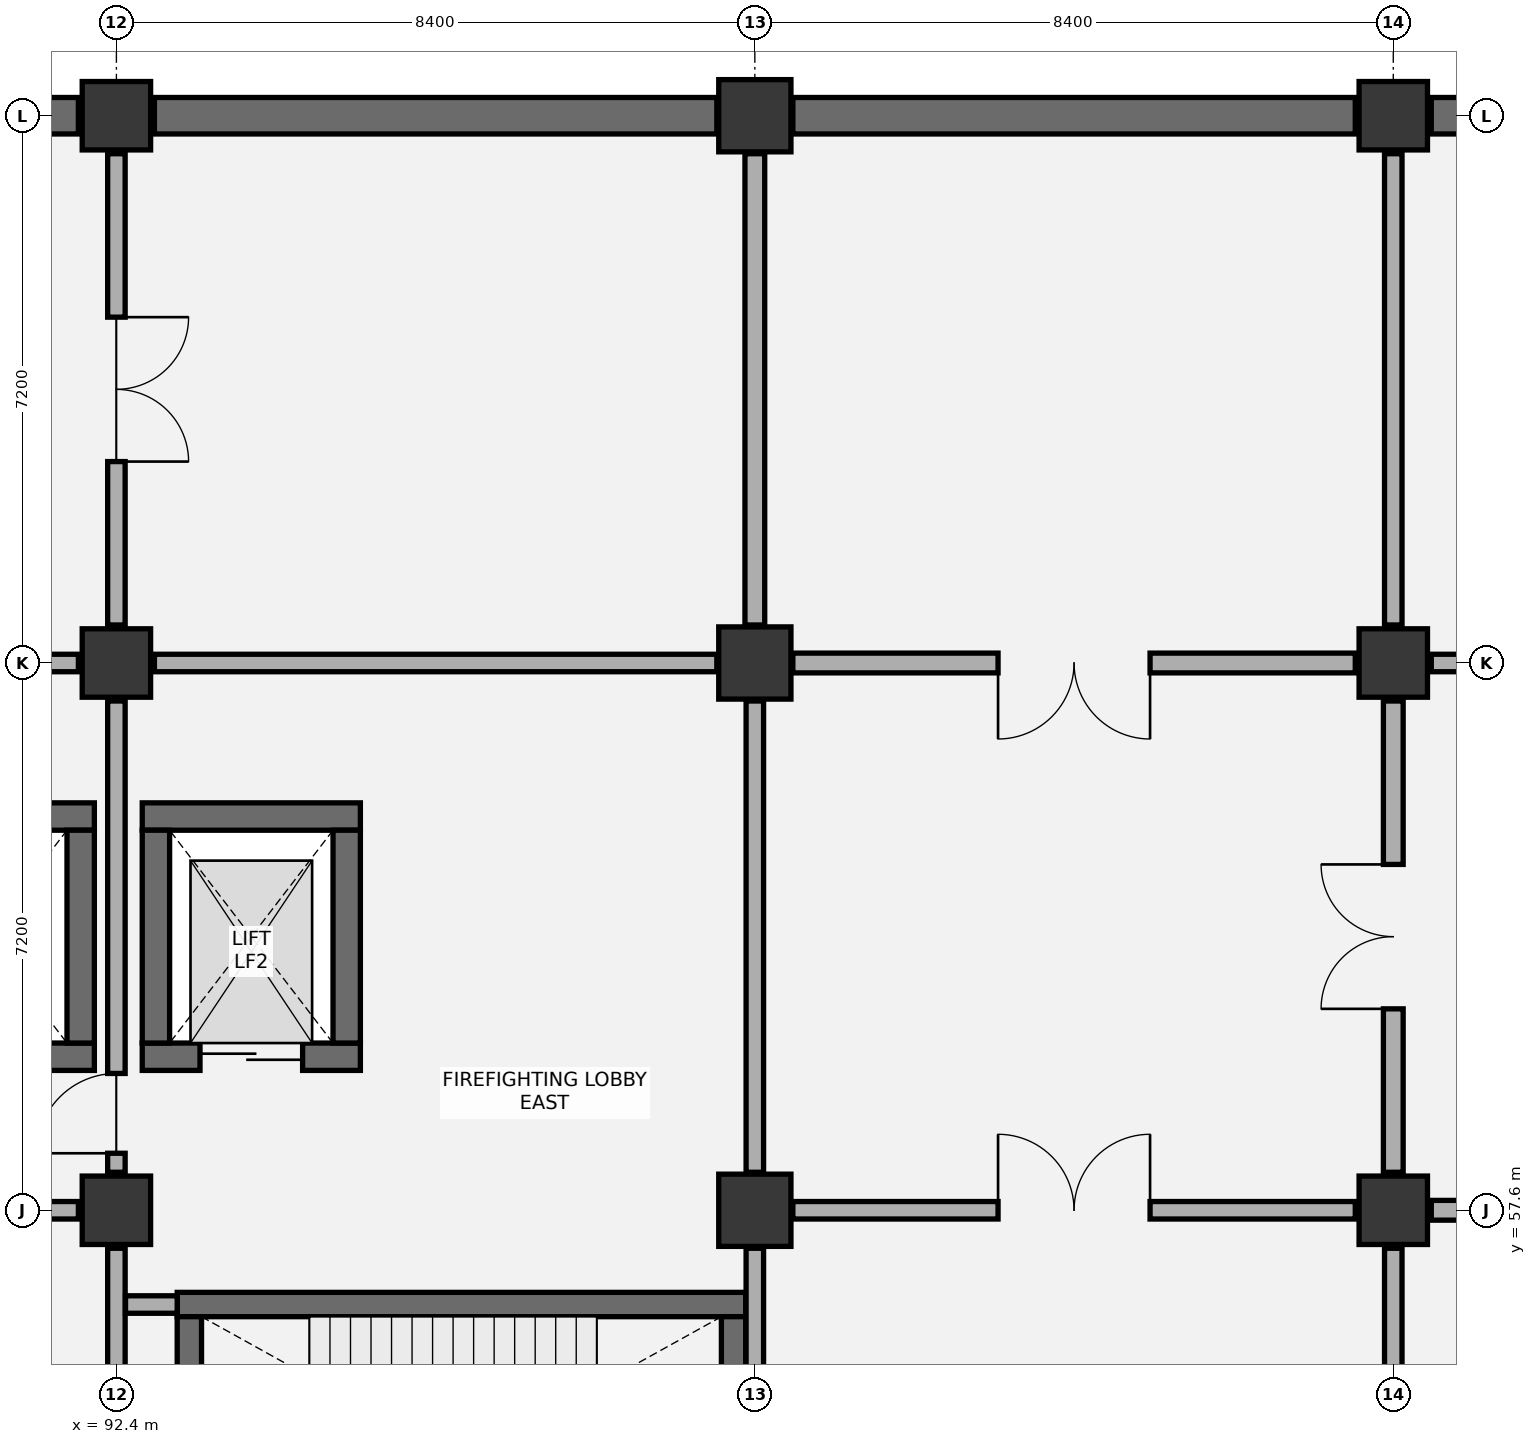
"""IFC4 building model, lengths in metres.
Left out: names, types, materials, properties, quantities, classifications, styles, units other than length and angle.
Written with IfcOpenShell. Run it as: python <this file> out.ifc"""

import sys

from ifc_helpers import new_model, si_unit, direction, frame, frame_2d, origin, origin_2d, place, context, subcontext, project, spatial, rectangle, extrude, element, fill, save


model = new_model("IFC4")
c1 = context("Model", 3, precision=1e-05, world=origin(), true_north=direction((0.0, 1.0)))
c2 = subcontext(c1, "Body", "Model", "MODEL_VIEW")
j1 = project(units=[si_unit("LENGTHUNIT", "METRE"), si_unit("PLANEANGLEUNIT", "RADIAN")], contexts=[c1])
p1 = place(None, origin())
s1 = spatial("IfcSite", under=j1, at=p1, CompositionType="ELEMENT")
p2 = place(p1, origin())
s2 = spatial("IfcBuilding", under=s1, at=p2, CompositionType="ELEMENT")
p3 = place(p2, frame((0.0, 0.0, -4.8)))
s3 = spatial("IfcBuildingStorey", under=s2, at=p3, CompositionType="ELEMENT", Elevation=-4.8)
for number, where, z_axis, x_axis in (
    (1, (92.4, 57.6, 0.0), (0.0, 0.0, 1.0), (1.0, 0.0, 0.0)),
    (2, (92.4, 64.8, 0.0), (0.0, 0.0, 1.0), (1.0, 0.0, 0.0)),
    (3, (92.4, 72.0, 0.0), (0.0, 0.0, 1.0), (1.0, 0.0, 0.0)),
):
    element("IfcColumn", number, at=place(p3, frame(where, z_axis=z_axis, x_axis=x_axis)), inside=s3, PredefinedType="COLUMN", context=c2, shape_type="SweptSolid", body=[
        extrude(rectangle(XDim=0.9, YDim=0.9, at=origin_2d()), origin(), (0.0, 0.0, 1.0), 4.8),
    ])
for number, where, z_axis, x_axis in (
    (4, (100.8, 57.6, 0.0), (0.0, 0.0, 1.0), (1.0, 0.0, 0.0)),
    (5, (100.8, 64.8, 0.0), (0.0, 0.0, 1.0), (1.0, 0.0, 0.0)),
    (6, (100.8, 72.0, 0.0), (0.0, 0.0, 1.0), (1.0, 0.0, 0.0)),
):
    element("IfcColumn", number, at=place(p3, frame(where, z_axis=z_axis, x_axis=x_axis)), inside=s3, PredefinedType="COLUMN", context=c2, shape_type="SweptSolid", body=[
        extrude(rectangle(XDim=0.95, YDim=0.95, at=origin_2d()), origin(), (0.0, 0.0, 1.0), 4.8),
    ])
for number, where, z_axis, x_axis in (
    (7, (109.2, 57.6, 0.0), (0.0, 0.0, 1.0), (1.0, 0.0, 0.0)),
    (8, (109.2, 64.8, 0.0), (0.0, 0.0, 1.0), (1.0, 0.0, 0.0)),
    (9, (109.2, 72.0, 0.0), (0.0, 0.0, 1.0), (1.0, 0.0, 0.0)),
):
    element("IfcColumn", number, at=place(p3, frame(where, z_axis=z_axis, x_axis=x_axis)), inside=s3, PredefinedType="COLUMN", context=c2, shape_type="SweptSolid", body=[
        extrude(rectangle(XDim=0.9, YDim=0.9, at=origin_2d()), origin(), (0.0, 0.0, 1.0), 4.8),
    ])
p4 = place(p3, frame((84.5, 72.0, 0.0), z_axis=(0.0, 0.0, 1.0), x_axis=(1.0, 0.0, 0.0)))
e10 = element("IfcWall", 10, at=p4, inside=s3, PredefinedType="USERDEFINED", context=c2, shape_type="SweptSolid", body=[
    extrude(rectangle(XDim=7.4, YDim=0.48, at=frame_2d((3.7, 0.0))), origin(), (0.0, 0.0, 1.0), 4.45),
])
p5 = place(p3, frame((92.9, 72.0, 0.0), z_axis=(0.0, 0.0, 1.0), x_axis=(1.0, 0.0, 0.0)))
e11 = element("IfcWall", 11, at=p5, inside=s3, PredefinedType="USERDEFINED", context=c2, shape_type="SweptSolid", body=[
    extrude(rectangle(XDim=7.4, YDim=0.48, at=frame_2d((3.7, 0.0))), origin(), (0.0, 0.0, 1.0), 4.45),
])
p6 = place(p3, frame((101.3, 72.0, 0.0), z_axis=(0.0, 0.0, 1.0), x_axis=(1.0, 0.0, 0.0)))
e12 = element("IfcWall", 12, at=p6, inside=s3, PredefinedType="USERDEFINED", context=c2, shape_type="SweptSolid", body=[
    extrude(rectangle(XDim=7.4, YDim=0.48, at=frame_2d((3.7, 0.0))), origin(), (0.0, 0.0, 1.0), 4.45),
])
p7 = place(p3, frame((109.7, 72.0, 0.0), z_axis=(0.0, 0.0, 1.0), x_axis=(1.0, 0.0, 0.0)))
e13 = element("IfcWall", 13, at=p7, inside=s3, PredefinedType="USERDEFINED", context=c2, shape_type="SweptSolid", body=[
    extrude(rectangle(XDim=7.4, YDim=0.48, at=frame_2d((3.7, 0.0))), origin(), (0.0, 0.0, 1.0), 4.45),
])
p8 = place(p3, frame((93.2, 56.36, 0.0), z_axis=(0.0, 0.0, 1.0), x_axis=(1.0, 0.0, 0.0)))
e14 = element("IfcWall", 14, at=p8, inside=s3, PredefinedType="SHEAR", context=c2, shape_type="SweptSolid", body=[
    extrude(rectangle(XDim=7.48, YDim=0.32, at=frame_2d((3.74, 0.0))), origin(), (0.0, 0.0, 1.0), 4.45),
])
for number, where, z_axis, x_axis in (
    (15, (93.36, 52.4, 0.0), (0.0, 0.0, 1.0), (0.0, 1.0, 0.0)),
    (16, (100.52, 52.4, 0.0), (0.0, 0.0, 1.0), (0.0, 1.0, 0.0)),
):
    element("IfcWall", number, at=place(p3, frame(where, z_axis=z_axis, x_axis=x_axis)), inside=s3, PredefinedType="SHEAR", context=c2, shape_type="SweptSolid", body=[
        extrude(rectangle(XDim=3.8, YDim=0.32, at=frame_2d((1.9, 0.0))), origin(), (0.0, 0.0, 1.0), 4.45),
    ])
p9 = place(p3, frame((84.34, 62.78, 0.0), z_axis=(0.0, 0.0, 1.0), x_axis=(1.0, 0.0, 0.0)))
e17 = element("IfcWall", 17, at=p9, inside=s3, PredefinedType="SHEAR", context=c2, shape_type="SweptSolid", body=[
    extrude(rectangle(XDim=7.77, YDim=0.36, at=frame_2d((3.885, 0.0))), origin(), (0.0, 0.0, 1.0), 4.45),
])
p10 = place(p3, frame((89.45, 59.62, 0.0), z_axis=(0.0, 0.0, 1.0), x_axis=(1.0, 0.0, 0.0)))
e18 = element("IfcWall", 18, at=p10, inside=s3, PredefinedType="SHEAR", context=c2, shape_type="SweptSolid", body=[
    extrude(rectangle(XDim=2.66, YDim=0.36, at=frame_2d((1.33, 0.0))), origin(), (0.0, 0.0, 1.0), 4.45),
])
p11 = place(p10, frame((0.78, 0.0, 0.0)))
e19 = element("IfcOpeningElement", 19, at=p11, cuts=e18, PredefinedType="OPENING", context=c2, shape_type="SweptSolid", body=[
    extrude(rectangle(XDim=1.1, YDim=2.15, at=frame_2d((0.55, 1.075))), frame((0.0, 0.19, 0.0), z_axis=(0.0, -1.0, 0.0), x_axis=(1.0, 0.0, 0.0)), (0.0, 0.0, 1.0), 0.38),
])
p12 = place(p3, frame((91.93, 59.8, 0.0), z_axis=(0.0, 0.0, 1.0), x_axis=(0.0, 1.0, 0.0)))
e20 = element("IfcWall", 20, at=p12, inside=s3, PredefinedType="SHEAR", context=c2, shape_type="SweptSolid", body=[
    extrude(rectangle(XDim=2.8, YDim=0.36, at=frame_2d((1.4, 0.0))), origin(), (0.0, 0.0, 1.0), 4.45),
])
p13 = place(p3, frame((92.74, 62.78, 0.0), z_axis=(0.0, 0.0, 1.0), x_axis=(1.0, 0.0, 0.0)))
e21 = element("IfcWall", 21, at=p13, inside=s3, PredefinedType="SHEAR", context=c2, shape_type="SweptSolid", body=[
    extrude(rectangle(XDim=2.87, YDim=0.36, at=frame_2d((1.435, 0.0))), origin(), (0.0, 0.0, 1.0), 4.45),
])
p14 = place(p3, frame((92.74, 59.62, 0.0), z_axis=(0.0, 0.0, 1.0), x_axis=(1.0, 0.0, 0.0)))
e22 = element("IfcWall", 22, at=p14, inside=s3, PredefinedType="SHEAR", context=c2, shape_type="SweptSolid", body=[
    extrude(rectangle(XDim=2.87, YDim=0.36, at=frame_2d((1.435, 0.0))), origin(), (0.0, 0.0, 1.0), 4.45),
])
p15 = place(p14, frame((0.76, 0.0, 0.0)))
e23 = element("IfcOpeningElement", 23, at=p15, cuts=e22, PredefinedType="OPENING", context=c2, shape_type="SweptSolid", body=[
    extrude(rectangle(XDim=1.35, YDim=2.2, at=frame_2d((0.675, 1.1))), frame((0.0, 0.19, 0.0), z_axis=(0.0, -1.0, 0.0), x_axis=(1.0, 0.0, 0.0)), (0.0, 0.0, 1.0), 0.38),
])
for number, where, z_axis, x_axis in (
    (24, (92.92, 59.8, 0.0), (0.0, 0.0, 1.0), (0.0, 1.0, 0.0)),
    (25, (95.43, 59.8, 0.0), (0.0, 0.0, 1.0), (0.0, 1.0, 0.0)),
):
    element("IfcWall", number, at=place(p3, frame(where, z_axis=z_axis, x_axis=x_axis)), inside=s3, PredefinedType="SHEAR", context=c2, shape_type="SweptSolid", body=[
        extrude(rectangle(XDim=2.8, YDim=0.36, at=frame_2d((1.4, 0.0))), origin(), (0.0, 0.0, 1.0), 4.45),
    ])
p16 = place(p3, frame((92.4, 50.9, 0.0), z_axis=(0.0, 0.0, 1.0), x_axis=(0.0, 1.0, 0.0)))
e26 = element("IfcWall", 26, at=p16, inside=s3, PredefinedType="PARTITIONING", context=c2, shape_type="SweptSolid", body=[
    extrude(rectangle(XDim=6.2, YDim=0.23, at=frame_2d((3.1, 0.0))), origin(), (0.0, 0.0, 1.0), 3.645),
])
p17 = place(p16, frame((0.05, 0.0, 0.0)))
e27 = element("IfcOpeningElement", 27, at=p17, cuts=e26, PredefinedType="OPENING", context=c2, shape_type="SweptSolid", body=[
    extrude(rectangle(XDim=1.05, YDim=2.15, at=frame_2d((0.525, 1.075))), frame((0.0, 0.125, 0.0), z_axis=(0.0, -1.0, 0.0), x_axis=(1.0, 0.0, 0.0)), (0.0, 0.0, 1.0), 0.25),
])
p18 = place(p3, frame((84.5, 57.6, 0.0), z_axis=(0.0, 0.0, 1.0), x_axis=(1.0, 0.0, 0.0)))
e28 = element("IfcWall", 28, at=p18, inside=s3, PredefinedType="PARTITIONING", context=c2, shape_type="SweptSolid", body=[
    extrude(rectangle(XDim=7.4, YDim=0.23, at=frame_2d((3.7, 0.0))), origin(), (0.0, 0.0, 1.0), 3.545),
])
p19 = place(p18, frame((2.95, 0.0, 0.0)))
e29 = element("IfcOpeningElement", 29, at=p19, cuts=e28, PredefinedType="OPENING", context=c2, shape_type="SweptSolid", body=[
    extrude(rectangle(XDim=1.5, YDim=2.15, at=frame_2d((0.75, 1.075))), frame((0.0, 0.125, 0.0), z_axis=(0.0, -1.0, 0.0), x_axis=(1.0, 0.0, 0.0)), (0.0, 0.0, 1.0), 0.25),
])
p20 = place(p3, frame((92.4, 58.1, 0.0), z_axis=(0.0, 0.0, 1.0), x_axis=(0.0, 1.0, 0.0)))
e30 = element("IfcWall", 30, at=p20, inside=s3, PredefinedType="PARTITIONING", context=c2, shape_type="SweptSolid", body=[
    extrude(rectangle(XDim=6.2, YDim=0.23, at=frame_2d((3.1, 0.0))), origin(), (0.0, 0.0, 1.0), 3.645),
])
p21 = place(p20, frame((0.25, 0.0, 0.0)))
e31 = element("IfcOpeningElement", 31, at=p21, cuts=e30, PredefinedType="OPENING", context=c2, shape_type="SweptSolid", body=[
    extrude(rectangle(XDim=1.05, YDim=2.15, at=frame_2d((0.525, 1.075))), frame((0.0, 0.125, 0.0), z_axis=(0.0, -1.0, 0.0), x_axis=(1.0, 0.0, 0.0)), (0.0, 0.0, 1.0), 0.25),
])
p22 = place(p3, frame((84.5, 64.8, 0.0), z_axis=(0.0, 0.0, 1.0), x_axis=(1.0, 0.0, 0.0)))
e32 = element("IfcWall", 32, at=p22, inside=s3, PredefinedType="PARTITIONING", context=c2, shape_type="SweptSolid", body=[
    extrude(rectangle(XDim=7.4, YDim=0.23, at=frame_2d((3.7, 0.0))), origin(), (0.0, 0.0, 1.0), 3.545),
])
p23 = place(p3, frame((92.4, 65.3, 0.0), z_axis=(0.0, 0.0, 1.0), x_axis=(0.0, 1.0, 0.0)))
e33 = element("IfcWall", 33, at=p23, inside=s3, PredefinedType="PARTITIONING", context=c2, shape_type="SweptSolid", body=[
    extrude(rectangle(XDim=6.2, YDim=0.23, at=frame_2d((3.1, 0.0))), origin(), (0.0, 0.0, 1.0), 3.645),
])
p24 = place(p23, frame((2.15, 0.0, 0.0)))
e34 = element("IfcOpeningElement", 34, at=p24, cuts=e33, PredefinedType="OPENING", context=c2, shape_type="SweptSolid", body=[
    extrude(rectangle(XDim=1.9, YDim=2.3, at=frame_2d((0.95, 1.15))), frame((0.0, 0.125, 0.0), z_axis=(0.0, -1.0, 0.0), x_axis=(1.0, 0.0, 0.0)), (0.0, 0.0, 1.0), 0.25),
])
p25 = place(p3, frame((100.8, 50.9, 0.0), z_axis=(0.0, 0.0, 1.0), x_axis=(0.0, 1.0, 0.0)))
e35 = element("IfcWall", 35, at=p25, inside=s3, PredefinedType="PARTITIONING", context=c2, shape_type="SweptSolid", body=[
    extrude(rectangle(XDim=6.2, YDim=0.23, at=frame_2d((3.1, 0.0))), origin(), (0.0, 0.0, 1.0), 3.645),
])
p26 = place(p3, frame((92.52, 56.36, 0.0), z_axis=(0.0, 0.0, 1.0), x_axis=(1.0, 0.0, 0.0)))
e36 = element("IfcWall", 36, at=p26, inside=s3, PredefinedType="PARTITIONING", context=c2, shape_type="SweptSolid", body=[
    extrude(rectangle(XDim=0.68, YDim=0.23, at=frame_2d((0.34, 0.0))), origin(), (0.0, 0.0, 1.0), 4.45),
])
p27 = place(p3, frame((100.8, 58.1, 0.0), z_axis=(0.0, 0.0, 1.0), x_axis=(0.0, 1.0, 0.0)))
e37 = element("IfcWall", 37, at=p27, inside=s3, PredefinedType="PARTITIONING", context=c2, shape_type="SweptSolid", body=[
    extrude(rectangle(XDim=6.2, YDim=0.23, at=frame_2d((3.1, 0.0))), origin(), (0.0, 0.0, 1.0), 3.645),
])
p28 = place(p3, frame((92.9, 64.8, 0.0), z_axis=(0.0, 0.0, 1.0), x_axis=(1.0, 0.0, 0.0)))
e38 = element("IfcWall", 38, at=p28, inside=s3, PredefinedType="PARTITIONING", context=c2, shape_type="SweptSolid", body=[
    extrude(rectangle(XDim=7.4, YDim=0.23, at=frame_2d((3.7, 0.0))), origin(), (0.0, 0.0, 1.0), 3.545),
])
p29 = place(p3, frame((100.8, 65.3, 0.0), z_axis=(0.0, 0.0, 1.0), x_axis=(0.0, 1.0, 0.0)))
e39 = element("IfcWall", 39, at=p29, inside=s3, PredefinedType="PARTITIONING", context=c2, shape_type="SweptSolid", body=[
    extrude(rectangle(XDim=6.2, YDim=0.26, at=frame_2d((3.1, 0.0))), origin(), (0.0, 0.0, 1.0), 3.645),
])
p30 = place(p3, frame((109.2, 50.9, 0.0), z_axis=(0.0, 0.0, 1.0), x_axis=(0.0, 1.0, 0.0)))
e40 = element("IfcWall", 40, at=p30, inside=s3, PredefinedType="PARTITIONING", context=c2, shape_type="SweptSolid", body=[
    extrude(rectangle(XDim=6.2, YDim=0.23, at=frame_2d((3.1, 0.0))), origin(), (0.0, 0.0, 1.0), 3.645),
])
p31 = place(p3, frame((101.3, 57.6, 0.0), z_axis=(0.0, 0.0, 1.0), x_axis=(1.0, 0.0, 0.0)))
e41 = element("IfcWall", 41, at=p31, inside=s3, PredefinedType="PARTITIONING", context=c2, shape_type="SweptSolid", body=[
    extrude(rectangle(XDim=7.4, YDim=0.23, at=frame_2d((3.7, 0.0))), origin(), (0.0, 0.0, 1.0), 3.545),
])
p32 = place(p31, frame((2.7, 0.0, 0.0)))
e42 = element("IfcOpeningElement", 42, at=p32, cuts=e41, PredefinedType="OPENING", context=c2, shape_type="SweptSolid", body=[
    extrude(rectangle(XDim=2.0, YDim=2.35, at=frame_2d((1.0, 1.175))), frame((0.0, 0.125, 0.0), z_axis=(0.0, -1.0, 0.0), x_axis=(1.0, 0.0, 0.0)), (0.0, 0.0, 1.0), 0.25),
])
p33 = place(p3, frame((109.2, 58.1, 0.0), z_axis=(0.0, 0.0, 1.0), x_axis=(0.0, 1.0, 0.0)))
e43 = element("IfcWall", 43, at=p33, inside=s3, PredefinedType="PARTITIONING", context=c2, shape_type="SweptSolid", body=[
    extrude(rectangle(XDim=6.2, YDim=0.26, at=frame_2d((3.1, 0.0))), origin(), (0.0, 0.0, 1.0), 3.645),
])
p34 = place(p33, frame((2.15, 0.0, 0.0)))
e44 = element("IfcOpeningElement", 44, at=p34, cuts=e43, PredefinedType="OPENING", context=c2, shape_type="SweptSolid", body=[
    extrude(rectangle(XDim=1.9, YDim=2.3, at=frame_2d((0.95, 1.15))), frame((0.0, 0.14, 0.0), z_axis=(0.0, -1.0, 0.0), x_axis=(1.0, 0.0, 0.0)), (0.0, 0.0, 1.0), 0.28),
])
p35 = place(p3, frame((101.3, 64.8, 0.0), z_axis=(0.0, 0.0, 1.0), x_axis=(1.0, 0.0, 0.0)))
e45 = element("IfcWall", 45, at=p35, inside=s3, PredefinedType="PARTITIONING", context=c2, shape_type="SweptSolid", body=[
    extrude(rectangle(XDim=7.4, YDim=0.26, at=frame_2d((3.7, 0.0))), origin(), (0.0, 0.0, 1.0), 3.545),
])
p36 = place(p35, frame((2.7, 0.0, 0.0)))
e46 = element("IfcOpeningElement", 46, at=p36, cuts=e45, PredefinedType="OPENING", context=c2, shape_type="SweptSolid", body=[
    extrude(rectangle(XDim=2.0, YDim=2.35, at=frame_2d((1.0, 1.175))), frame((0.0, 0.14, 0.0), z_axis=(0.0, -1.0, 0.0), x_axis=(1.0, 0.0, 0.0)), (0.0, 0.0, 1.0), 0.28),
])
p37 = place(p3, frame((109.2, 65.3, 0.0), z_axis=(0.0, 0.0, 1.0), x_axis=(0.0, 1.0, 0.0)))
e47 = element("IfcWall", 47, at=p37, inside=s3, PredefinedType="PARTITIONING", context=c2, shape_type="SweptSolid", body=[
    extrude(rectangle(XDim=6.2, YDim=0.23, at=frame_2d((3.1, 0.0))), origin(), (0.0, 0.0, 1.0), 3.645),
])
p38 = place(p3, frame((109.7, 57.6, 0.0), z_axis=(0.0, 0.0, 1.0), x_axis=(1.0, 0.0, 0.0)))
e48 = element("IfcWall", 48, at=p38, inside=s3, PredefinedType="PARTITIONING", context=c2, shape_type="SweptSolid", body=[
    extrude(rectangle(XDim=7.4, YDim=0.26, at=frame_2d((3.7, 0.0))), origin(), (0.0, 0.0, 1.0), 3.545),
])
p39 = place(p38, frame((2.7, 0.0, 0.0)))
e49 = element("IfcOpeningElement", 49, at=p39, cuts=e48, PredefinedType="OPENING", context=c2, shape_type="SweptSolid", body=[
    extrude(rectangle(XDim=2.0, YDim=2.35, at=frame_2d((1.0, 1.175))), frame((0.0, 0.14, 0.0), z_axis=(0.0, -1.0, 0.0), x_axis=(1.0, 0.0, 0.0)), (0.0, 0.0, 1.0), 0.28),
])
p40 = place(p3, frame((109.7, 64.8, 0.0), z_axis=(0.0, 0.0, 1.0), x_axis=(1.0, 0.0, 0.0)))
e50 = element("IfcWall", 50, at=p40, inside=s3, PredefinedType="PARTITIONING", context=c2, shape_type="SweptSolid", body=[
    extrude(rectangle(XDim=7.4, YDim=0.23, at=frame_2d((3.7, 0.0))), origin(), (0.0, 0.0, 1.0), 3.545),
])
p41 = place(p15, origin())
e51 = element("IfcDoor", 51, at=p41, inside=s3, OperationType="DOUBLE_DOOR_SLIDING", PredefinedType="DOOR", context=c2, shape_type="SweptSolid", body=[
    extrude(rectangle(XDim=1.35, YDim=2.2, at=frame_2d((0.675, 1.1))), frame((0.0, 0.025, 0.0), z_axis=(0.0, -1.0, 0.0), x_axis=(1.0, 0.0, 0.0)), (0.0, 0.0, 1.0), 0.05),
])
fill(e23, e51)
p42 = place(p21, origin())
e52 = element("IfcDoor", 52, at=p42, inside=s3, OperationType="SINGLE_SWING_LEFT", PredefinedType="DOOR", context=c2, shape_type="SweptSolid", body=[
    extrude(rectangle(XDim=1.05, YDim=2.15, at=frame_2d((0.525, 1.075))), frame((0.0, 0.025, 0.0), z_axis=(0.0, -1.0, 0.0), x_axis=(1.0, 0.0, 0.0)), (0.0, 0.0, 1.0), 0.05),
])
fill(e31, e52)
p43 = place(p24, frame((1.9, 0.0, 0.0), z_axis=(0.0, 0.0, 1.0), x_axis=(-1.0, 0.0, 0.0)))
e53 = element("IfcDoor", 53, at=p43, inside=s3, OperationType="DOUBLE_DOOR_SINGLE_SWING", PredefinedType="DOOR", context=c2, shape_type="SweptSolid", body=[
    extrude(rectangle(XDim=1.9, YDim=2.3, at=frame_2d((0.95, 1.15))), frame((0.0, 0.025, 0.0), z_axis=(0.0, -1.0, 0.0), x_axis=(1.0, 0.0, 0.0)), (0.0, 0.0, 1.0), 0.05),
])
fill(e34, e53)
p44 = place(p32, origin())
e54 = element("IfcDoor", 54, at=p44, inside=s3, OperationType="DOUBLE_DOOR_SINGLE_SWING", PredefinedType="DOOR", context=c2, shape_type="SweptSolid", body=[
    extrude(rectangle(XDim=2.0, YDim=2.35, at=frame_2d((1.0, 1.175))), frame((0.0, 0.025, 0.0), z_axis=(0.0, -1.0, 0.0), x_axis=(1.0, 0.0, 0.0)), (0.0, 0.0, 1.0), 0.05),
])
fill(e42, e54)
p45 = place(p34, origin())
e55 = element("IfcDoor", 55, at=p45, inside=s3, OperationType="DOUBLE_DOOR_SINGLE_SWING", PredefinedType="DOOR", context=c2, shape_type="SweptSolid", body=[
    extrude(rectangle(XDim=1.9, YDim=2.3, at=frame_2d((0.95, 1.15))), frame((0.0, 0.025, 0.0), z_axis=(0.0, -1.0, 0.0), x_axis=(1.0, 0.0, 0.0)), (0.0, 0.0, 1.0), 0.05),
])
fill(e44, e55)
p46 = place(p36, frame((2.0, 0.0, 0.0), z_axis=(0.0, 0.0, 1.0), x_axis=(-1.0, 0.0, 0.0)))
e56 = element("IfcDoor", 56, at=p46, inside=s3, OperationType="DOUBLE_DOOR_SINGLE_SWING", PredefinedType="DOOR", context=c2, shape_type="SweptSolid", body=[
    extrude(rectangle(XDim=2.0, YDim=2.35, at=frame_2d((1.0, 1.175))), frame((0.0, 0.025, 0.0), z_axis=(0.0, -1.0, 0.0), x_axis=(1.0, 0.0, 0.0)), (0.0, 0.0, 1.0), 0.05),
])
fill(e46, e56)
save(model, sys.argv[1])
